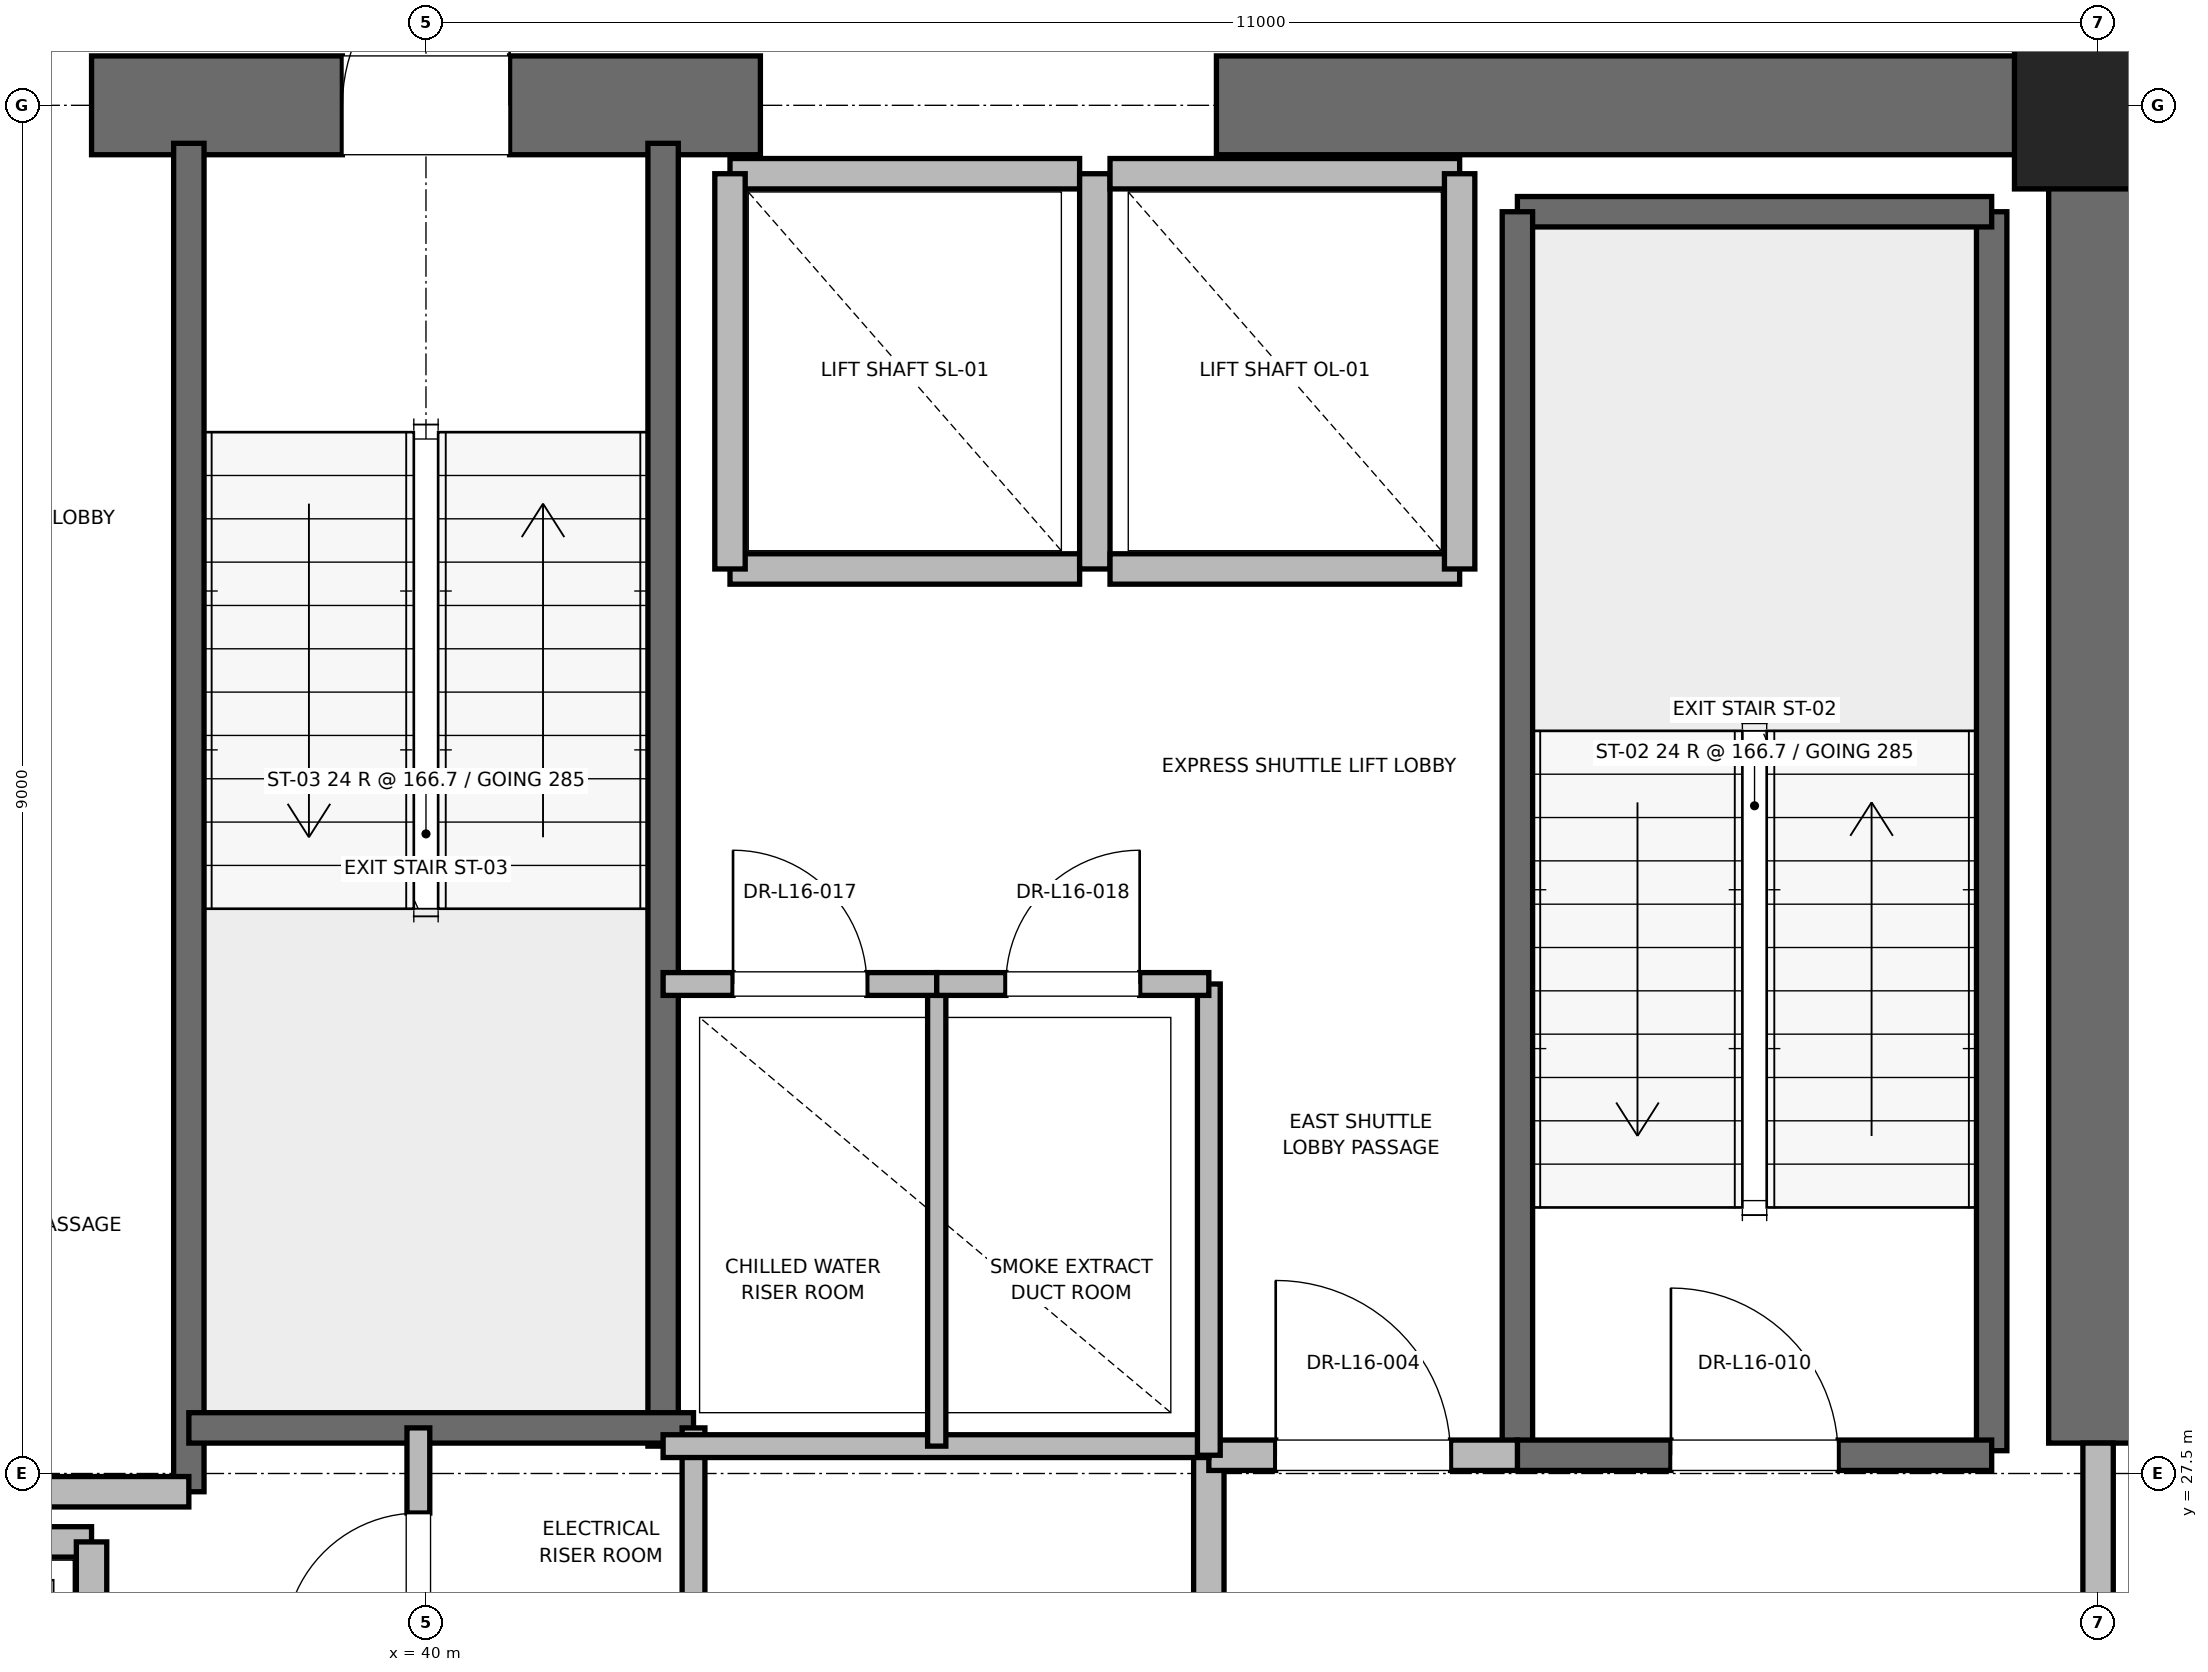
"""IFC4 building model, lengths in metres.
Left out: names, types, materials, properties, quantities, classifications, styles, units other than length and angle.
Written with IfcOpenShell. Run it as: python <this file> out.ifc"""

import sys

from ifc_helpers import new_model, si_unit, direction, frame, frame_2d, origin, origin_2d, place, context, subcontext, project, spatial, rectangle, extrude, element, fill, save


model = new_model("IFC4")
c1 = context("Model", 3, precision=1e-05, world=origin(), true_north=direction((0.0, 1.0)))
c2 = subcontext(c1, "Body", "Model", "MODEL_VIEW")
j1 = project(units=[si_unit("LENGTHUNIT", "METRE"), si_unit("PLANEANGLEUNIT", "RADIAN")], contexts=[c1])
p1 = place(None, origin())
s1 = spatial("IfcSite", under=j1, at=p1, CompositionType="ELEMENT")
p2 = place(p1, origin())
s2 = spatial("IfcBuilding", under=s1, at=p2, CompositionType="ELEMENT")
p3 = place(p2, frame((0.0, 0.0, 71.6)))
s3 = spatial("IfcBuildingStorey", under=s2, at=p3, CompositionType="ELEMENT", Elevation=71.6)
p4 = place(p3, frame((51.0, 36.5, 0.0), z_axis=(0.0, 0.0, 1.0), x_axis=(1.0, 0.0, 0.0)))
e1 = element("IfcColumn", 1, at=p4, inside=s3, PredefinedType="PILASTER", context=c2, shape_type="SweptSolid", body=[
    extrude(rectangle(XDim=1.1, YDim=1.1, at=origin_2d()), origin(), (0.0, 0.0, 1.0), 4.0),
])
p5 = place(p3, frame((37.8, 36.5, 0.0), z_axis=(0.0, 0.0, 1.0), x_axis=(1.0, 0.0, 0.0)))
e2 = element("IfcWall", 2, at=p5, inside=s3, PredefinedType="SHEAR", context=c2, shape_type="SweptSolid", body=[
    extrude(rectangle(XDim=4.4, YDim=0.65, at=frame_2d((2.2, 0.0))), origin(), (0.0, 0.0, 1.0), 3.76),
])
p6 = place(p5, frame((1.65, 0.0, 0.0)))
e3 = element("IfcOpeningElement", 3, at=p6, cuts=e2, PredefinedType="OPENING", context=c2, shape_type="SweptSolid", body=[
    extrude(rectangle(XDim=1.1, YDim=2.15, at=frame_2d((0.55, 1.075))), frame((0.0, 0.325, 0.0), z_axis=(0.0, -1.0, 0.0), x_axis=(1.0, 0.0, 0.0)), (0.0, 0.0, 1.0), 0.65),
])
p7 = place(p3, frame((45.2, 36.5, 0.0), z_axis=(0.0, 0.0, 1.0), x_axis=(1.0, 0.0, 0.0)))
e4 = element("IfcWall", 4, at=p7, inside=s3, PredefinedType="SHEAR", context=c2, shape_type="SweptSolid", body=[
    extrude(rectangle(XDim=5.8, YDim=0.65, at=frame_2d((2.9, 0.0))), origin(), (0.0, 0.0, 1.0), 3.76),
])
p8 = place(p3, frame((51.0, 27.7, 0.0), z_axis=(0.0, 0.0, 1.0), x_axis=(0.0, 1.0, 0.0)))
e5 = element("IfcWall", 5, at=p8, inside=s3, PredefinedType="SHEAR", context=c2, shape_type="SweptSolid", body=[
    extrude(rectangle(XDim=8.8, YDim=0.65, at=frame_2d((4.4, 0.0))), origin(), (0.0, 0.0, 1.0), 3.76),
])
p9 = place(p3, frame((50.3, 27.65, 0.0), z_axis=(0.0, 0.0, 1.0), x_axis=(0.0, 1.0, 0.0)))
e6 = element("IfcWall", 6, at=p9, inside=s3, PredefinedType="SOLIDWALL", context=c2, shape_type="SweptSolid", body=[
    extrude(rectangle(XDim=8.15, YDim=0.2, at=frame_2d((4.075, 0.0))), origin(), (0.0, 0.0, 1.0), 3.76),
])
p10 = place(p3, frame((47.18, 35.8, 0.0), z_axis=(0.0, 0.0, 1.0), x_axis=(1.0, 0.0, 0.0)))
e7 = element("IfcWall", 7, at=p10, inside=s3, PredefinedType="SOLIDWALL", context=c2, shape_type="SweptSolid", body=[
    extrude(rectangle(XDim=3.12, YDim=0.2, at=frame_2d((1.56, 0.0))), origin(), (0.0, 0.0, 1.0), 3.76),
])
p11 = place(p3, frame((47.18, 27.62, 0.0), z_axis=(0.0, 0.0, 1.0), x_axis=(0.0, 1.0, 0.0)))
e8 = element("IfcWall", 8, at=p11, inside=s3, PredefinedType="SOLIDWALL", context=c2, shape_type="SweptSolid", body=[
    extrude(rectangle(XDim=8.18, YDim=0.2, at=frame_2d((4.09, 0.0))), origin(), (0.0, 0.0, 1.0), 3.76),
])
p12 = place(p3, frame((47.18, 27.62, 0.0), z_axis=(0.0, 0.0, 1.0), x_axis=(1.0, 0.0, 0.0)))
e9 = element("IfcWall", 9, at=p12, inside=s3, PredefinedType="SOLIDWALL", context=c2, shape_type="SweptSolid", body=[
    extrude(rectangle(XDim=3.12, YDim=0.2, at=frame_2d((1.56, 0.0))), origin(), (0.0, 0.0, 1.0), 3.76),
])
p13 = place(p12, frame((1.01, 0.0, 0.0)))
e10 = element("IfcOpeningElement", 10, at=p13, cuts=e9, PredefinedType="OPENING", context=c2, shape_type="SweptSolid", body=[
    extrude(rectangle(XDim=1.1, YDim=2.15, at=frame_2d((0.55, 1.075))), frame((0.0, 0.1, 0.0), z_axis=(0.0, -1.0, 0.0), x_axis=(1.0, 0.0, 0.0)), (0.0, 0.0, 1.0), 0.2),
])
p14 = place(p3, frame((38.44, 27.38, 0.0), z_axis=(0.0, 0.0, 1.0), x_axis=(0.0, 1.0, 0.0)))
e11 = element("IfcWall", 11, at=p14, inside=s3, PredefinedType="SOLIDWALL", context=c2, shape_type="SweptSolid", body=[
    extrude(rectangle(XDim=8.87, YDim=0.2, at=frame_2d((4.435, 0.0))), origin(), (0.0, 0.0, 1.0), 3.76),
])
p15 = place(p3, frame((41.56, 27.68, 0.0), z_axis=(0.0, 0.0, 1.0), x_axis=(0.0, 1.0, 0.0)))
e12 = element("IfcWall", 12, at=p15, inside=s3, PredefinedType="SOLIDWALL", context=c2, shape_type="SweptSolid", body=[
    extrude(rectangle(XDim=8.57, YDim=0.2, at=frame_2d((4.285, 0.0))), origin(), (0.0, 0.0, 1.0), 3.76),
])
p16 = place(p3, frame((38.44, 27.8, 0.0), z_axis=(0.0, 0.0, 1.0), x_axis=(1.0, 0.0, 0.0)))
e13 = element("IfcWall", 13, at=p16, inside=s3, PredefinedType="SOLIDWALL", context=c2, shape_type="SweptSolid", body=[
    extrude(rectangle(XDim=3.32, YDim=0.2, at=frame_2d((1.66, 0.0))), origin(), (0.0, 0.0, 1.0), 3.76),
])
p17 = place(p3, frame((32.82, 27.38, 0.0), z_axis=(0.0, 0.0, 1.0), x_axis=(1.0, 0.0, 0.0)))
e14 = element("IfcWall", 14, at=p17, inside=s3, PredefinedType="PARTITIONING", context=c2, shape_type="SweptSolid", body=[
    extrude(rectangle(XDim=5.62, YDim=0.2, at=frame_2d((2.81, 0.0))), origin(), (0.0, 0.0, 1.0), 3.76),
])
p18 = place(p3, frame((45.15, 24.25, 0.0), z_axis=(0.0, 0.0, 1.0), x_axis=(0.0, 1.0, 0.0)))
e15 = element("IfcWall", 15, at=p18, inside=s3, PredefinedType="PARTITIONING", context=c2, shape_type="SweptSolid", body=[
    extrude(rectangle(XDim=3.37, YDim=0.2, at=frame_2d((1.685, 0.0))), origin(), (0.0, 0.0, 1.0), 3.76),
])
p19 = place(p3, frame((45.15, 27.62, 0.0), z_axis=(0.0, 0.0, 1.0), x_axis=(1.0, 0.0, 0.0)))
e16 = element("IfcWall", 16, at=p19, inside=s3, PredefinedType="PARTITIONING", context=c2, shape_type="SweptSolid", body=[
    extrude(rectangle(XDim=2.03, YDim=0.2, at=frame_2d((1.015, 0.0))), origin(), (0.0, 0.0, 1.0), 3.76),
])
p20 = place(p19, frame((0.44, 0.0, 0.0)))
e17 = element("IfcOpeningElement", 17, at=p20, cuts=e16, PredefinedType="OPENING", context=c2, shape_type="SweptSolid", body=[
    extrude(rectangle(XDim=1.15, YDim=2.2, at=frame_2d((0.575, 1.1))), frame((0.0, 0.1, 0.0), z_axis=(0.0, -1.0, 0.0), x_axis=(1.0, 0.0, 0.0)), (0.0, 0.0, 1.0), 0.2),
])
p21 = place(p3, frame((51.0, 24.3, 0.0), z_axis=(0.0, 0.0, 1.0), x_axis=(0.0, 1.0, 0.0)))
e18 = element("IfcWall", 18, at=p21, inside=s3, PredefinedType="PARTITIONING", context=c2, shape_type="SweptSolid", body=[
    extrude(rectangle(XDim=3.4, YDim=0.2, at=frame_2d((1.7, 0.0))), origin(), (0.0, 0.0, 1.0), 2.54),
])
p22 = place(p21, frame((1.125, 0.0, 0.0)))
e19 = element("IfcOpeningElement", 19, at=p22, cuts=e18, PredefinedType="OPENING", context=c2, shape_type="SweptSolid", body=[
    extrude(rectangle(XDim=1.15, YDim=2.2, at=frame_2d((0.575, 1.1))), frame((0.0, 0.1, 0.0), z_axis=(0.0, -1.0, 0.0), x_axis=(1.0, 0.0, 0.0)), (0.0, 0.0, 1.0), 0.2),
])
p23 = place(p3, frame((37.8, 27.05, 0.0), z_axis=(0.0, 0.0, 1.0), x_axis=(-1.0, 0.0, 0.0)))
e20 = element("IfcWall", 20, at=p23, inside=s3, PredefinedType="SOLIDWALL", context=c2, shape_type="SweptSolid", body=[
    extrude(rectangle(XDim=2.3, YDim=0.2, at=frame_2d((1.15, 0.0))), origin(), (0.0, 0.0, 1.0), 3.76),
])
p24 = place(p3, frame((37.8, 24.45, 0.0), z_axis=(0.0, 0.0, 1.0), x_axis=(0.0, 1.0, 0.0)))
e21 = element("IfcWall", 21, at=p24, inside=s3, PredefinedType="SOLIDWALL", context=c2, shape_type="SweptSolid", body=[
    extrude(rectangle(XDim=2.6, YDim=0.2, at=frame_2d((1.3, 0.0))), origin(), (0.0, 0.0, 1.0), 3.76),
])
p25 = place(p3, frame((42.0, 33.45, 0.0), z_axis=(0.0, 0.0, 1.0), x_axis=(1.0, 0.0, 0.0)))
e22 = element("IfcWall", 22, at=p25, inside=s3, PredefinedType="SOLIDWALL", context=c2, shape_type="SweptSolid", body=[
    extrude(rectangle(XDim=2.3, YDim=0.2, at=frame_2d((1.15, 0.0))), origin(), (0.0, 0.0, 1.0), 3.76),
])
p26 = place(p3, frame((44.3, 36.05, 0.0), z_axis=(0.0, 0.0, 1.0), x_axis=(-1.0, 0.0, 0.0)))
e23 = element("IfcWall", 23, at=p26, inside=s3, PredefinedType="SOLIDWALL", context=c2, shape_type="SweptSolid", body=[
    extrude(rectangle(XDim=2.3, YDim=0.2, at=frame_2d((1.15, 0.0))), origin(), (0.0, 0.0, 1.0), 2.54),
])
for number, where, z_axis, x_axis in (
    (24, (42.0, 36.05, 0.0), (0.0, 0.0, 1.0), (0.0, -1.0, 0.0)),
    (25, (44.4, 33.45, 0.0), (0.0, 0.0, 1.0), (0.0, 1.0, 0.0)),
):
    element("IfcWall", number, at=place(p3, frame(where, z_axis=z_axis, x_axis=x_axis)), inside=s3, PredefinedType="SOLIDWALL", context=c2, shape_type="SweptSolid", body=[
        extrude(rectangle(XDim=2.6, YDim=0.2, at=frame_2d((1.3, 0.0))), origin(), (0.0, 0.0, 1.0), 2.54),
    ])
p27 = place(p3, frame((44.5, 33.45, 0.0), z_axis=(0.0, 0.0, 1.0), x_axis=(1.0, 0.0, 0.0)))
e26 = element("IfcWall", 26, at=p27, inside=s3, PredefinedType="SOLIDWALL", context=c2, shape_type="SweptSolid", body=[
    extrude(rectangle(XDim=2.3, YDim=0.2, at=frame_2d((1.15, 0.0))), origin(), (0.0, 0.0, 1.0), 3.76),
])
p28 = place(p3, frame((46.8, 36.05, 0.0), z_axis=(0.0, 0.0, 1.0), x_axis=(-1.0, 0.0, 0.0)))
e27 = element("IfcWall", 27, at=p28, inside=s3, PredefinedType="SOLIDWALL", context=c2, shape_type="SweptSolid", body=[
    extrude(rectangle(XDim=2.3, YDim=0.2, at=frame_2d((1.15, 0.0))), origin(), (0.0, 0.0, 1.0), 2.54),
])
p29 = place(p3, frame((46.8, 33.45, 0.0), z_axis=(0.0, 0.0, 1.0), x_axis=(0.0, 1.0, 0.0)))
e28 = element("IfcWall", 28, at=p29, inside=s3, PredefinedType="SOLIDWALL", context=c2, shape_type="SweptSolid", body=[
    extrude(rectangle(XDim=2.6, YDim=0.2, at=frame_2d((1.3, 0.0))), origin(), (0.0, 0.0, 1.0), 3.76),
])
p30 = place(p3, frame((41.76, 23.8, 0.0), z_axis=(0.0, 0.0, 1.0), x_axis=(0.0, 1.0, 0.0)))
e29 = element("IfcWall", 29, at=p30, inside=s3, PredefinedType="PARTITIONING", context=c2, shape_type="SweptSolid", body=[
    extrude(rectangle(XDim=4.0, YDim=0.15, at=frame_2d((2.0, 0.0))), origin(), (0.0, 0.0, 1.0), 2.85),
])
p31 = place(p3, frame((39.95, 25.8, 0.0), z_axis=(0.0, 0.0, 1.0), x_axis=(0.0, 1.0, 0.0)))
e30 = element("IfcWall", 30, at=p31, inside=s3, PredefinedType="PARTITIONING", context=c2, shape_type="SweptSolid", body=[
    extrude(rectangle(XDim=2.0, YDim=0.15, at=frame_2d((1.0, 0.0))), origin(), (0.0, 0.0, 1.0), 2.85),
])
p32 = place(p31, frame((0.56, 0.0, 0.0)))
e31 = element("IfcOpeningElement", 31, at=p32, cuts=e30, PredefinedType="OPENING", context=c2, shape_type="SweptSolid", body=[
    extrude(rectangle(XDim=0.88, YDim=2.1, at=frame_2d((0.44, 1.05))), frame((0.0, 0.075, 0.0), z_axis=(0.0, -1.0, 0.0), x_axis=(1.0, 0.0, 0.0)), (0.0, 0.0, 1.0), 0.15),
])
p33 = place(p3, frame((41.56, 27.68, 0.0), z_axis=(0.0, 0.0, 1.0), x_axis=(1.0, 0.0, 0.0)))
e32 = element("IfcWall", 32, at=p33, inside=s3, PredefinedType="PARTITIONING", context=c2, shape_type="SweptSolid", body=[
    extrude(rectangle(XDim=3.59, YDim=0.15, at=frame_2d((1.795, 0.0))), origin(), (0.0, 0.0, 1.0), 2.85),
])
p34 = place(p3, frame((45.15, 27.62, 0.0), z_axis=(0.0, 0.0, 1.0), x_axis=(0.0, 1.0, 0.0)))
e33 = element("IfcWall", 33, at=p34, inside=s3, PredefinedType="PARTITIONING", context=c2, shape_type="SweptSolid", body=[
    extrude(rectangle(XDim=3.1, YDim=0.15, at=frame_2d((1.55, 0.0))), origin(), (0.0, 0.0, 1.0), 2.85),
])
p35 = place(p3, frame((43.36, 27.68, 0.0), z_axis=(0.0, 0.0, 1.0), x_axis=(0.0, 1.0, 0.0)))
e34 = element("IfcWall", 34, at=p35, inside=s3, PredefinedType="PARTITIONING", context=c2, shape_type="SweptSolid", body=[
    extrude(rectangle(XDim=3.04, YDim=0.12, at=frame_2d((1.52, 0.0))), origin(), (0.0, 0.0, 1.0), 2.85),
])
p36 = place(p3, frame((41.56, 30.72, 0.0), z_axis=(0.0, 0.0, 1.0), x_axis=(1.0, 0.0, 0.0)))
e35 = element("IfcWall", 35, at=p36, inside=s3, PredefinedType="PARTITIONING", context=c2, shape_type="SweptSolid", body=[
    extrude(rectangle(XDim=1.8, YDim=0.15, at=frame_2d((0.9, 0.0))), origin(), (0.0, 0.0, 1.0), 2.85),
])
p37 = place(p36, frame((0.46, 0.0, 0.0)))
e36 = element("IfcOpeningElement", 36, at=p37, cuts=e35, PredefinedType="OPENING", context=c2, shape_type="SweptSolid", body=[
    extrude(rectangle(XDim=0.88, YDim=2.1, at=frame_2d((0.44, 1.05))), frame((0.0, 0.075, 0.0), z_axis=(0.0, -1.0, 0.0), x_axis=(1.0, 0.0, 0.0)), (0.0, 0.0, 1.0), 0.15),
])
p38 = place(p3, frame((43.36, 30.72, 0.0), z_axis=(0.0, 0.0, 1.0), x_axis=(1.0, 0.0, 0.0)))
e37 = element("IfcWall", 37, at=p38, inside=s3, PredefinedType="PARTITIONING", context=c2, shape_type="SweptSolid", body=[
    extrude(rectangle(XDim=1.79, YDim=0.15, at=frame_2d((0.895, 0.0))), origin(), (0.0, 0.0, 1.0), 2.85),
])
p39 = place(p38, frame((0.455, 0.0, 0.0)))
e38 = element("IfcOpeningElement", 38, at=p39, cuts=e37, PredefinedType="OPENING", context=c2, shape_type="SweptSolid", body=[
    extrude(rectangle(XDim=0.88, YDim=2.1, at=frame_2d((0.44, 1.05))), frame((0.0, 0.075, 0.0), z_axis=(0.0, -1.0, 0.0), x_axis=(1.0, 0.0, 0.0)), (0.0, 0.0, 1.0), 0.15),
])
p40 = place(p13, origin())
e39 = element("IfcDoor", 39, at=p40, inside=s3, OperationType="SINGLE_SWING_LEFT", PredefinedType="DOOR", context=c2, shape_type="SweptSolid", body=[
    extrude(rectangle(XDim=1.1, YDim=2.15, at=frame_2d((0.55, 1.075))), frame((0.0, 0.025, 0.0), z_axis=(0.0, -1.0, 0.0), x_axis=(1.0, 0.0, 0.0)), (0.0, 0.0, 1.0), 0.05),
])
fill(e10, e39)
p41 = place(p6, origin())
e40 = element("IfcDoor", 40, at=p41, inside=s3, OperationType="SINGLE_SWING_RIGHT", PredefinedType="DOOR", context=c2, shape_type="SweptSolid", body=[
    extrude(rectangle(XDim=1.1, YDim=2.15, at=frame_2d((0.55, 1.075))), frame((0.0, 0.025, 0.0), z_axis=(0.0, -1.0, 0.0), x_axis=(1.0, 0.0, 0.0)), (0.0, 0.0, 1.0), 0.05),
])
fill(e3, e40)
p42 = place(p20, origin())
e41 = element("IfcDoor", 41, at=p42, inside=s3, OperationType="SINGLE_SWING_LEFT", PredefinedType="DOOR", context=c2, shape_type="SweptSolid", body=[
    extrude(rectangle(XDim=1.15, YDim=2.2, at=frame_2d((0.575, 1.1))), frame((0.0, 0.025, 0.0), z_axis=(0.0, -1.0, 0.0), x_axis=(1.0, 0.0, 0.0)), (0.0, 0.0, 1.0), 0.05),
])
fill(e17, e41)
p43 = place(p32, origin())
e42 = element("IfcDoor", 42, at=p43, inside=s3, OperationType="SINGLE_SWING_LEFT", PredefinedType="DOOR", context=c2, shape_type="SweptSolid", body=[
    extrude(rectangle(XDim=0.88, YDim=2.1, at=frame_2d((0.44, 1.05))), frame((0.0, 0.025, 0.0), z_axis=(0.0, -1.0, 0.0), x_axis=(1.0, 0.0, 0.0)), (0.0, 0.0, 1.0), 0.05),
])
fill(e31, e42)
p44 = place(p37, origin())
e43 = element("IfcDoor", 43, at=p44, inside=s3, OperationType="SINGLE_SWING_LEFT", PredefinedType="DOOR", context=c2, shape_type="SweptSolid", body=[
    extrude(rectangle(XDim=0.88, YDim=2.1, at=frame_2d((0.44, 1.05))), frame((0.0, 0.025, 0.0), z_axis=(0.0, -1.0, 0.0), x_axis=(1.0, 0.0, 0.0)), (0.0, 0.0, 1.0), 0.05),
])
fill(e36, e43)
p45 = place(p39, origin())
e44 = element("IfcDoor", 44, at=p45, inside=s3, OperationType="SINGLE_SWING_RIGHT", PredefinedType="DOOR", context=c2, shape_type="SweptSolid", body=[
    extrude(rectangle(XDim=0.88, YDim=2.1, at=frame_2d((0.44, 1.05))), frame((0.0, 0.025, 0.0), z_axis=(0.0, -1.0, 0.0), x_axis=(1.0, 0.0, 0.0)), (0.0, 0.0, 1.0), 0.05),
])
fill(e38, e44)
save(model, sys.argv[1])
